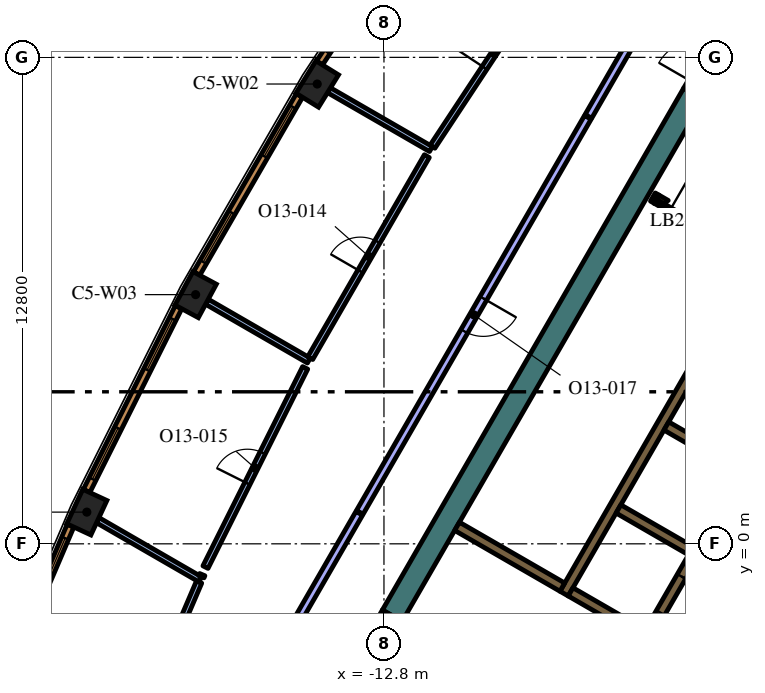
"""IFC4 building model, lengths in metres.
Left out: names, types, materials, properties, quantities, classifications, styles, units other than length and angle.
Written with IfcOpenShell. Run it as: python <this file> out.ifc"""

import sys

from ifc_helpers import new_model, si_unit, direction, frame, frame_2d, origin, origin_2d, place, context, subcontext, project, spatial, polyline, rectangle, outline, extrude, element, fill, save


model = new_model("IFC4")
c1 = context("Model", 3, precision=1e-05, world=origin(), true_north=direction((0.0, 1.0)))
c2 = subcontext(c1, "Body", "Model", "MODEL_VIEW")
j1 = project(units=[si_unit("LENGTHUNIT", "METRE"), si_unit("PLANEANGLEUNIT", "RADIAN")], contexts=[c1])
p1 = place(None, origin())
s1 = spatial("IfcSite", under=j1, at=p1, CompositionType="ELEMENT")
p2 = place(p1, origin())
s2 = spatial("IfcBuilding", under=s1, at=p2, CompositionType="ELEMENT")
p3 = place(p2, frame((0.0, 0.0, 300.6)))
s3 = spatial("IfcBuildingStorey", under=s2, at=p3, CompositionType="ELEMENT", Elevation=300.6)
for number, where, z_axis, x_axis in (
    (1, (-14.556, 12.098, 0.0), (0.0, 0.0, 1.0), (-0.526, -0.851, 0.0)),
    (2, (-17.756, 6.557, 0.0), (0.0, 0.0, 1.0), (-0.474, -0.881, 0.0)),
    (3, (-20.619, 0.834, 0.0), (0.0, 0.0, 1.0), (-0.421, -0.907, 0.0)),
):
    element("IfcColumn", number, at=place(p3, frame(where, z_axis=z_axis, x_axis=x_axis)), inside=s3, PredefinedType="COLUMN", context=c2, shape_type="SweptSolid", body=[
        extrude(rectangle(XDim=1.0, YDim=0.7, at=origin_2d()), origin(), (0.0, 0.0, 1.0), 4.2),
    ])
p4 = place(p3, frame((-12.582, -1.892, 0.0), z_axis=(0.0, 0.0, 1.0), x_axis=(0.500003640647, 0.866023301845, 0.0)))
e4 = element("IfcWall", 4, at=p4, inside=s3, PredefinedType="SOLIDWALL", context=c2, shape_type="SweptSolid", body=[
    extrude(rectangle(XDim=15.858, YDim=0.6, at=frame_2d((7.929, 0.0))), origin(), (0.0, 0.0, 1.0), 4.2),
])
p5 = place(p3, frame((-8.06, -1.311, 0.0), z_axis=(0.0, 0.0, 1.0), x_axis=(0.50000273126, 0.866023826885, 0.0)))
e5 = element("IfcWall", 5, at=p5, inside=s3, PredefinedType="SOLIDWALL", context=c2, shape_type="SweptSolid", body=[
    extrude(rectangle(XDim=10.33, YDim=0.25, at=frame_2d((5.165, 0.0))), origin(), (0.0, 0.0, 1.0), 4.2),
])
for number, where, z_axis, x_axis in (
    (6, (-5.369, 3.1, 0.0), (0.0, 0.0, 1.0), (0.866, -0.5, 0.0)),
    (7, (-4.724, -0.182, 0.0), (0.0, 0.0, 1.0), (-0.866, 0.5, 0.0)),
):
    element("IfcWall", number, at=place(p3, frame(where, z_axis=z_axis, x_axis=x_axis)), inside=s3, PredefinedType="SOLIDWALL", context=c2, shape_type="SweptSolid", body=[
        extrude(rectangle(XDim=2.2, YDim=0.25, at=frame_2d((1.1, 0.0))), origin(), (0.0, 0.0, 1.0), 4.2),
    ])
p6 = place(p3, frame((-7.889, -1.265, 0.0), z_axis=(0.0, 0.0, 1.0), x_axis=(0.865986741702, -0.500066958712, 0.0)))
e8 = element("IfcWall", 8, at=p6, inside=s3, PredefinedType="SOLIDWALL", context=c2, shape_type="SweptSolid", body=[
    extrude(rectangle(XDim=1.738, YDim=0.25, at=frame_2d((0.869, 0.0))), origin(), (0.0, 0.0, 1.0), 4.2),
])
p7 = place(p3, frame((-8.106, -1.14, 0.0), z_axis=(0.0, 0.0, 1.0), x_axis=(-0.866008981251, 0.500028443584, 0.0)))
e9 = element("IfcWall", 9, at=p7, inside=s3, PredefinedType="SOLIDWALL", context=c2, shape_type="SweptSolid", body=[
    extrude(rectangle(XDim=3.2, YDim=0.25, at=frame_2d((1.6, 0.0))), origin(), (0.0, 0.0, 1.0), 4.2),
])
p8 = place(p3, frame((-5.725, 9.125, 0.0), z_axis=(0.0, 0.0, 1.0), x_axis=(0.866185586049, -0.49972245349, 0.0)))
e10 = element("IfcWall", 10, at=p8, inside=s3, PredefinedType="SOLIDWALL", context=c2, shape_type="SweptSolid", body=[
    extrude(rectangle(XDim=0.11, YDim=0.25, at=frame_2d((0.055, 0.0))), origin(), (0.0, 0.0, 1.0), 4.2),
])
p9 = place(p3, origin())
e11 = element("IfcWall", 11, at=p9, inside=s3, PredefinedType="SOLIDWALL", context=c2, shape_type="SweptSolid", body=[
    extrude(outline(polyline([(-5.689, 8.96), (-5.69, 8.961), (-5.565, 9.177), (-5.319, 9.035), (-5.335, 9.026), (-5.351, 9.015), (-5.366, 9.002), (-5.379, 8.988), (-5.392, 8.972), (-5.402, 8.956), (-5.412, 8.939), (-5.629, 9.064), (-5.629, 9.064), (-5.689, 8.96)])), origin(), (0.0, 0.0, 1.0), 4.2),
])
p10 = place(p3, frame((-0.898, 6.194, 0.0), z_axis=(0.0, 0.0, 1.0), x_axis=(-0.499996202215, -0.866027596426, 0.0)))
e12 = element("IfcWall", 12, at=p10, inside=s3, PredefinedType="SOLIDWALL", context=c2, shape_type="SweptSolid", body=[
    extrude(rectangle(XDim=9.83, YDim=0.25, at=frame_2d((4.915, 0.0))), origin(), (0.0, 0.0, 1.0), 4.2),
])
p11 = place(p10, frame((0.585, 0.0, 0.0)))
e13 = element("IfcOpeningElement", 13, at=p11, cuts=e12, PredefinedType="OPENING", context=c2, shape_type="SweptSolid", body=[
    extrude(rectangle(XDim=1.1, YDim=2.1, at=frame_2d((0.55, 1.05))), frame((0.0, 0.135, 0.0), z_axis=(0.0, -1.0, 0.0), x_axis=(1.0, 0.0, 0.0)), (0.0, 0.0, 1.0), 0.27),
])
p12 = place(p10, frame((3.105, 0.0, 0.0)))
e14 = element("IfcOpeningElement", 14, at=p12, cuts=e12, PredefinedType="OPENING", context=c2, shape_type="SweptSolid", body=[
    extrude(rectangle(XDim=1.1, YDim=2.1, at=frame_2d((0.55, 1.05))), frame((0.0, 0.135, 0.0), z_axis=(0.0, -1.0, 0.0), x_axis=(1.0, 0.0, 0.0)), (0.0, 0.0, 1.0), 0.27),
])
p13 = place(p10, frame((5.625, 0.0, 0.0)))
e15 = element("IfcOpeningElement", 15, at=p13, cuts=e12, PredefinedType="OPENING", context=c2, shape_type="SweptSolid", body=[
    extrude(rectangle(XDim=1.1, YDim=2.1, at=frame_2d((0.55, 1.05))), frame((0.0, 0.135, 0.0), z_axis=(0.0, -1.0, 0.0), x_axis=(1.0, 0.0, 0.0)), (0.0, 0.0, 1.0), 0.27),
])
p14 = place(p10, frame((8.145, 0.0, 0.0)))
e16 = element("IfcOpeningElement", 16, at=p14, cuts=e12, PredefinedType="OPENING", context=c2, shape_type="SweptSolid", body=[
    extrude(rectangle(XDim=1.1, YDim=2.1, at=frame_2d((0.55, 1.05))), frame((0.0, 0.135, 0.0), z_axis=(0.0, -1.0, 0.0), x_axis=(1.0, 0.0, 0.0)), (0.0, 0.0, 1.0), 0.27),
])
p15 = place(p3, frame((-5.659, 9.012, 0.0), z_axis=(0.0, 0.0, 1.0), x_axis=(0.866009402589, -0.500027713859, 0.0)))
e17 = element("IfcWall", 17, at=p15, inside=s3, PredefinedType="PARTITIONING", context=c2, shape_type="SweptSolid", body=[
    extrude(rectangle(XDim=2.1, YDim=0.12, at=frame_2d((1.05, 0.0))), origin(), (0.0, 0.0, 1.0), 3.55),
])
p16 = place(p15, frame((0.45, 0.0, 0.0)))
e18 = element("IfcOpeningElement", 18, at=p16, cuts=e17, PredefinedType="OPENING", context=c2, shape_type="SweptSolid", body=[
    extrude(rectangle(XDim=1.2, YDim=2.1, at=frame_2d((0.6, 1.05))), frame((0.0, 0.07, 0.0), z_axis=(0.0, -1.0, 0.0), x_axis=(1.0, 0.0, 0.0)), (0.0, 0.0, 1.0), 0.14),
])
p17 = place(p3, frame((-4.652, 11.842, 0.0), z_axis=(0.0, 0.0, 1.0), x_axis=(0.500062241894, 0.865989465428, 0.0)))
e19 = element("IfcWall", 19, at=p17, inside=s3, PredefinedType="SOLIDWALL", context=c2, shape_type="SweptSolid", body=[
    extrude(rectangle(XDim=1.7, YDim=0.6, at=frame_2d((0.85, 0.0))), origin(), (0.0, 0.0, 1.0), 4.2),
])
p18 = place(p17, frame((0.25, 0.0, 0.0)))
e20 = element("IfcOpeningElement", 20, at=p18, cuts=e19, PredefinedType="OPENING", context=c2, shape_type="SweptSolid", body=[
    extrude(rectangle(XDim=1.2, YDim=2.1, at=frame_2d((0.6, 1.05))), frame((0.0, 0.31, 0.0), z_axis=(0.0, -1.0, 0.0), x_axis=(1.0, 0.0, 0.0)), (0.0, 0.0, 1.0), 0.62),
])
p19 = place(p3, frame((-13.432, -3.364, 0.0), z_axis=(0.0, 0.0, 1.0), x_axis=(0.500062241894, 0.865989465428, 0.0)))
e21 = element("IfcWall", 21, at=p19, inside=s3, PredefinedType="SOLIDWALL", context=c2, shape_type="SweptSolid", body=[
    extrude(rectangle(XDim=1.7, YDim=0.6, at=frame_2d((0.85, 0.0))), origin(), (0.0, 0.0, 1.0), 4.2),
])
p20 = place(p19, frame((0.25, 0.0, 0.0)))
e22 = element("IfcOpeningElement", 22, at=p20, cuts=e21, PredefinedType="OPENING", context=c2, shape_type="SweptSolid", body=[
    extrude(rectangle(XDim=1.2, YDim=2.1, at=frame_2d((0.6, 1.05))), frame((0.0, 0.31, 0.0), z_axis=(0.0, -1.0, 0.0), x_axis=(1.0, 0.0, 0.0)), (0.0, 0.0, 1.0), 0.62),
])
p21 = place(p3, frame((-11.564, 10.387, 0.0), z_axis=(0.0, 0.0, 1.0), x_axis=(-0.86604641216, 0.499963610661, 0.0)))
e23 = element("IfcWall", 23, at=p21, inside=s3, PredefinedType="PARTITIONING", context=c2, shape_type="SweptSolid", body=[
    extrude(rectangle(XDim=3.096, YDim=0.15, at=frame_2d((1.548, 0.0))), origin(), (0.0, 0.0, 1.0), 3.55),
])
p22 = place(p3, frame((-11.523, 10.449, 0.0), z_axis=(0.0, 0.0, 1.0), x_axis=(0.550751709023, 0.834669129061, 0.0)))
e24 = element("IfcWall", 24, at=p22, inside=s3, PredefinedType="PARTITIONING", context=c2, shape_type="SweptSolid", body=[
    extrude(rectangle(XDim=5.788, YDim=0.15, at=frame_2d((2.894, 0.0))), origin(), (0.0, 0.0, 1.0), 3.55),
])
p23 = place(p22, frame((2.488, 0.0, 0.0)))
e25 = element("IfcOpeningElement", 25, at=p23, cuts=e24, PredefinedType="OPENING", context=c2, shape_type="SweptSolid", body=[
    extrude(rectangle(XDim=0.9, YDim=2.1, at=frame_2d((0.45, 1.05))), frame((0.0, 0.085, 0.0), z_axis=(0.0, -1.0, 0.0), x_axis=(1.0, 0.0, 0.0)), (0.0, 0.0, 1.0), 0.17),
])
p24 = place(p3, frame((-14.777, 4.822, 0.0), z_axis=(0.0, 0.0, 1.0), x_axis=(-0.865992557167, 0.500056887695, 0.0)))
e26 = element("IfcWall", 26, at=p24, inside=s3, PredefinedType="PARTITIONING", context=c2, shape_type="SweptSolid", body=[
    extrude(rectangle(XDim=3.096, YDim=0.15, at=frame_2d((1.548, 0.0))), origin(), (0.0, 0.0, 1.0), 3.55),
])
p25 = place(p3, frame((-14.74, 4.887, 0.0), z_axis=(0.0, 0.0, 1.0), x_axis=(0.500007141444, 0.86602128063, 0.0)))
e27 = element("IfcWall", 27, at=p25, inside=s3, PredefinedType="PARTITIONING", context=c2, shape_type="SweptSolid", body=[
    extrude(rectangle(XDim=6.137, YDim=0.15, at=frame_2d((3.068, 0.0))), origin(), (0.0, 0.0, 1.0), 3.55),
])
p26 = place(p25, frame((2.637, 0.0, 0.0)))
e28 = element("IfcOpeningElement", 28, at=p26, cuts=e27, PredefinedType="OPENING", context=c2, shape_type="SweptSolid", body=[
    extrude(rectangle(XDim=0.9, YDim=2.1, at=frame_2d((0.45, 1.05))), frame((0.0, 0.085, 0.0), z_axis=(0.0, -1.0, 0.0), x_axis=(1.0, 0.0, 0.0)), (0.0, 0.0, 1.0), 0.17),
])
p27 = place(p3, frame((-17.635, -0.936, 0.0), z_axis=(0.0, 0.0, 1.0), x_axis=(-0.866044607523, 0.499966736674, 0.0)))
e29 = element("IfcWall", 29, at=p27, inside=s3, PredefinedType="PARTITIONING", context=c2, shape_type="SweptSolid", body=[
    extrude(rectangle(XDim=3.115, YDim=0.15, at=frame_2d((1.557, 0.0))), origin(), (0.0, 0.0, 1.0), 3.55),
])
p28 = place(p3, frame((-17.497, -0.613, 0.0), z_axis=(0.0, 0.0, 1.0), x_axis=(0.447480081559, 0.89429389834, 0.0)))
e30 = element("IfcWall", 30, at=p28, inside=s3, PredefinedType="PARTITIONING", context=c2, shape_type="SweptSolid", body=[
    extrude(rectangle(XDim=5.863, YDim=0.15, at=frame_2d((2.931, 0.0))), origin(), (0.0, 0.0, 1.0), 3.55),
])
p29 = place(p28, frame((2.463, 0.0, 0.0)))
e31 = element("IfcOpeningElement", 31, at=p29, cuts=e30, PredefinedType="OPENING", context=c2, shape_type="SweptSolid", body=[
    extrude(rectangle(XDim=0.9, YDim=2.1, at=frame_2d((0.45, 1.05))), frame((0.0, 0.085, 0.0), z_axis=(0.0, -1.0, 0.0), x_axis=(1.0, 0.0, 0.0)), (0.0, 0.0, 1.0), 0.17),
])
p30 = place(p3, frame((-17.581, -0.81, 0.0), z_axis=(0.0, 0.0, 1.0), x_axis=(-0.390033474923, -0.92080067791, 0.0)))
e32 = element("IfcWall", 32, at=p30, inside=s3, PredefinedType="PARTITIONING", context=c2, shape_type="SweptSolid", body=[
    extrude(rectangle(XDim=0.061, YDim=0.15, at=frame_2d((0.03, 0.0))), origin(), (0.0, 0.0, 1.0), 3.55),
])
p31 = place(p3, frame((-19.639, -5.62, 0.0), z_axis=(0.0, 0.0, 1.0), x_axis=(0.393349802257, 0.919388891092, 0.0)))
e33 = element("IfcWall", 33, at=p31, inside=s3, PredefinedType="PARTITIONING", context=c2, shape_type="SweptSolid", body=[
    extrude(rectangle(XDim=5.019, YDim=0.15, at=frame_2d((2.51, 0.0))), origin(), (0.0, 0.0, 1.0), 3.55),
])
p32 = place(p31, frame((2.019, 0.0, 0.0)))
e34 = element("IfcOpeningElement", 34, at=p32, cuts=e33, PredefinedType="OPENING", context=c2, shape_type="SweptSolid", body=[
    extrude(rectangle(XDim=0.9, YDim=2.1, at=frame_2d((0.45, 1.05))), frame((0.0, 0.085, 0.0), z_axis=(0.0, -1.0, 0.0), x_axis=(1.0, 0.0, 0.0)), (0.0, 0.0, 1.0), 0.17),
])
p33 = place(p3, frame((-7.436, 11.221, 0.0), z_axis=(0.0, 0.0, 1.0), x_axis=(-0.49999894854, -0.866026010844, 0.0)))
e35 = element("IfcWall", 35, at=p33, inside=s3, PredefinedType="PARTITIONING", context=c2, shape_type="SweptSolid", body=[
    extrude(rectangle(XDim=12.0, YDim=0.2, at=frame_2d((6.0, 0.0))), origin(), (0.0, 0.0, 1.0), 3.55),
])
p34 = place(p33, frame((5.5, 0.0, 0.0)))
e36 = element("IfcOpeningElement", 36, at=p34, cuts=e35, PredefinedType="OPENING", context=c2, shape_type="SweptSolid", body=[
    extrude(rectangle(XDim=1.0, YDim=2.1, at=frame_2d((0.5, 1.05))), frame((0.0, 0.11, 0.0), z_axis=(0.0, -1.0, 0.0), x_axis=(1.0, 0.0, 0.0)), (0.0, 0.0, 1.0), 0.22),
])
p35 = place(p3, frame((-13.451, 0.803, 0.0), z_axis=(0.0, 0.0, 1.0), x_axis=(-0.499979102685, -0.866037468519, 0.0)))
e37 = element("IfcWall", 37, at=p35, inside=s3, PredefinedType="PARTITIONING", context=c2, shape_type="SweptSolid", body=[
    extrude(rectangle(XDim=7.795, YDim=0.2, at=frame_2d((3.897, 0.0))), origin(), (0.0, 0.0, 1.0), 3.55),
])
p36 = place(p3, frame((-3.306, 18.374, 0.0), z_axis=(0.0, 0.0, 1.0), x_axis=(-0.499999798456, -0.866025520146, 0.0)))
e38 = element("IfcWall", 38, at=p36, inside=s3, PredefinedType="PARTITIONING", context=c2, shape_type="SweptSolid", body=[
    extrude(rectangle(XDim=8.229, YDim=0.2, at=frame_2d((4.115, 0.0))), origin(), (0.0, 0.0, 1.0), 3.55),
])
p37 = place(p3, frame((-11.518, 17.166, 0.0), z_axis=(0.0, 0.0, 1.0), x_axis=(-0.550744054781, -0.83467417962, 0.0)))
e39 = element("IfcWall", 39, at=p37, inside=s3, PredefinedType="SOLIDWALL", context=c2, shape_type="SweptSolid", body=[
    extrude(rectangle(XDim=5.406, YDim=0.19, at=frame_2d((2.703, 0.0))), origin(), (0.0, 0.0, 1.0), 3.95),
])
p38 = place(p37, frame((0.346, 0.0, 0.6)))
e40 = element("IfcOpeningElement", 40, at=p38, cuts=e39, PredefinedType="OPENING", context=c2, shape_type="SweptSolid", body=[
    extrude(rectangle(XDim=1.5, YDim=2.85, at=frame_2d((0.75, 1.425))), frame((0.0, 0.105, 0.0), z_axis=(0.0, -1.0, 0.0), x_axis=(1.0, 0.0, 0.0)), (0.0, 0.0, 1.0), 0.21),
])
p39 = place(p37, frame((3.559, 0.0, 0.6)))
e41 = element("IfcOpeningElement", 41, at=p39, cuts=e39, PredefinedType="OPENING", context=c2, shape_type="SweptSolid", body=[
    extrude(rectangle(XDim=1.5, YDim=2.85, at=frame_2d((0.75, 1.425))), frame((0.0, 0.105, 0.0), z_axis=(0.0, -1.0, 0.0), x_axis=(1.0, 0.0, 0.0)), (0.0, 0.0, 1.0), 0.21),
])
p40 = place(p3, frame((-15.025, 11.796, 0.0), z_axis=(0.0, 0.0, 1.0), x_axis=(-0.500024767483, -0.866011103799, 0.0)))
e42 = element("IfcWall", 42, at=p40, inside=s3, PredefinedType="SOLIDWALL", context=c2, shape_type="SweptSolid", body=[
    extrude(rectangle(XDim=5.406, YDim=0.19, at=frame_2d((2.703, 0.0))), origin(), (0.0, 0.0, 1.0), 3.95),
])
p41 = place(p40, frame((0.346, 0.0, 0.6)))
e43 = element("IfcOpeningElement", 43, at=p41, cuts=e42, PredefinedType="OPENING", context=c2, shape_type="SweptSolid", body=[
    extrude(rectangle(XDim=1.5, YDim=2.85, at=frame_2d((0.75, 1.425))), frame((0.0, 0.105, 0.0), z_axis=(0.0, -1.0, 0.0), x_axis=(1.0, 0.0, 0.0)), (0.0, 0.0, 1.0), 0.21),
])
p42 = place(p40, frame((3.559, 0.0, 0.6)))
e44 = element("IfcOpeningElement", 44, at=p42, cuts=e42, PredefinedType="OPENING", context=c2, shape_type="SweptSolid", body=[
    extrude(rectangle(XDim=1.5, YDim=2.85, at=frame_2d((0.75, 1.425))), frame((0.0, 0.105, 0.0), z_axis=(0.0, -1.0, 0.0), x_axis=(1.0, 0.0, 0.0)), (0.0, 0.0, 1.0), 0.21),
])
p43 = place(p3, frame((-18.206, 6.227, 0.0), z_axis=(0.0, 0.0, 1.0), x_axis=(-0.447484531401, -0.894291671747, 0.0)))
e45 = element("IfcWall", 45, at=p43, inside=s3, PredefinedType="SOLIDWALL", context=c2, shape_type="SweptSolid", body=[
    extrude(rectangle(XDim=5.406, YDim=0.19, at=frame_2d((2.703, 0.0))), origin(), (0.0, 0.0, 1.0), 3.95),
])
p44 = place(p43, frame((0.346, 0.0, 0.6)))
e46 = element("IfcOpeningElement", 46, at=p44, cuts=e45, PredefinedType="OPENING", context=c2, shape_type="SweptSolid", body=[
    extrude(rectangle(XDim=1.5, YDim=2.85, at=frame_2d((0.75, 1.425))), frame((0.0, 0.105, 0.0), z_axis=(0.0, -1.0, 0.0), x_axis=(1.0, 0.0, 0.0)), (0.0, 0.0, 1.0), 0.21),
])
p45 = place(p43, frame((3.559, 0.0, 0.6)))
e47 = element("IfcOpeningElement", 47, at=p45, cuts=e45, PredefinedType="OPENING", context=c2, shape_type="SweptSolid", body=[
    extrude(rectangle(XDim=1.5, YDim=2.85, at=frame_2d((0.75, 1.425))), frame((0.0, 0.105, 0.0), z_axis=(0.0, -1.0, 0.0), x_axis=(1.0, 0.0, 0.0)), (0.0, 0.0, 1.0), 0.21),
])
p46 = place(p3, frame((-21.049, 0.478, 0.0), z_axis=(0.0, 0.0, 1.0), x_axis=(-0.393347848476, -0.919389726992, 0.0)))
e48 = element("IfcWall", 48, at=p46, inside=s3, PredefinedType="SOLIDWALL", context=c2, shape_type="SweptSolid", body=[
    extrude(rectangle(XDim=5.415, YDim=0.19, at=frame_2d((2.708, 0.0))), origin(), (0.0, 0.0, 1.0), 3.95),
])
p47 = place(p46, frame((0.357, 0.0, 0.6)))
e49 = element("IfcOpeningElement", 49, at=p47, cuts=e48, PredefinedType="OPENING", context=c2, shape_type="SweptSolid", body=[
    extrude(rectangle(XDim=1.5, YDim=2.85, at=frame_2d((0.75, 1.425))), frame((0.0, 0.105, 0.0), z_axis=(0.0, -1.0, 0.0), x_axis=(1.0, 0.0, 0.0)), (0.0, 0.0, 1.0), 0.21),
])
p48 = place(p46, frame((3.593, 0.0, 0.6)))
e50 = element("IfcOpeningElement", 50, at=p48, cuts=e48, PredefinedType="OPENING", context=c2, shape_type="SweptSolid", body=[
    extrude(rectangle(XDim=1.5, YDim=2.85, at=frame_2d((0.75, 1.425))), frame((0.0, 0.105, 0.0), z_axis=(0.0, -1.0, 0.0), x_axis=(1.0, 0.0, 0.0)), (0.0, 0.0, 1.0), 0.21),
])
p49 = place(p14, origin())
e51 = element("IfcDoor", 51, at=p49, inside=s3, OperationType="DOUBLE_DOOR_SLIDING", PredefinedType="DOOR", context=c2, shape_type="SweptSolid", body=[
    extrude(rectangle(XDim=1.1, YDim=2.1, at=frame_2d((0.55, 1.05))), frame((0.0, 0.025, 0.0), z_axis=(0.0, -1.0, 0.0), x_axis=(1.0, 0.0, 0.0)), (0.0, 0.0, 1.0), 0.05),
])
fill(e16, e51)
p50 = place(p16, origin())
e52 = element("IfcDoor", 52, at=p50, inside=s3, OperationType="SINGLE_SWING_LEFT", PredefinedType="DOOR", context=c2, shape_type="SweptSolid", body=[
    extrude(rectangle(XDim=1.2, YDim=2.1, at=frame_2d((0.6, 1.05))), frame((0.0, 0.025, 0.0), z_axis=(0.0, -1.0, 0.0), x_axis=(1.0, 0.0, 0.0)), (0.0, 0.0, 1.0), 0.05),
])
fill(e18, e52)
p51 = place(p23, origin())
e53 = element("IfcDoor", 53, at=p51, inside=s3, OperationType="SINGLE_SWING_RIGHT", PredefinedType="DOOR", context=c2, shape_type="SweptSolid", body=[
    extrude(rectangle(XDim=0.9, YDim=2.1, at=frame_2d((0.45, 1.05))), frame((0.0, 0.025, 0.0), z_axis=(0.0, -1.0, 0.0), x_axis=(1.0, 0.0, 0.0)), (0.0, 0.0, 1.0), 0.05),
])
fill(e25, e53)
p52 = place(p26, origin())
e54 = element("IfcDoor", 54, at=p52, inside=s3, OperationType="SINGLE_SWING_RIGHT", PredefinedType="DOOR", context=c2, shape_type="SweptSolid", body=[
    extrude(rectangle(XDim=0.9, YDim=2.1, at=frame_2d((0.45, 1.05))), frame((0.0, 0.025, 0.0), z_axis=(0.0, -1.0, 0.0), x_axis=(1.0, 0.0, 0.0)), (0.0, 0.0, 1.0), 0.05),
])
fill(e28, e54)
p53 = place(p29, origin())
e55 = element("IfcDoor", 55, at=p53, inside=s3, OperationType="SINGLE_SWING_LEFT", PredefinedType="DOOR", context=c2, shape_type="SweptSolid", body=[
    extrude(rectangle(XDim=0.9, YDim=2.1, at=frame_2d((0.45, 1.05))), frame((0.0, 0.025, 0.0), z_axis=(0.0, -1.0, 0.0), x_axis=(1.0, 0.0, 0.0)), (0.0, 0.0, 1.0), 0.05),
])
fill(e31, e55)
p54 = place(p34, origin())
e56 = element("IfcDoor", 56, at=p54, inside=s3, OperationType="SINGLE_SWING_RIGHT", PredefinedType="DOOR", context=c2, shape_type="SweptSolid", body=[
    extrude(rectangle(XDim=1.0, YDim=2.1, at=frame_2d((0.5, 1.05))), frame((0.0, 0.025, 0.0), z_axis=(0.0, -1.0, 0.0), x_axis=(1.0, 0.0, 0.0)), (0.0, 0.0, 1.0), 0.05),
])
fill(e36, e56)
p55 = place(p39, origin())
e57 = element("IfcWindow", 57, at=p55, inside=s3, PartitioningType="SINGLE_PANEL", PredefinedType="WINDOW", context=c2, shape_type="SweptSolid", body=[
    extrude(rectangle(XDim=1.5, YDim=2.85, at=frame_2d((0.75, 1.425))), frame((0.0, 0.045, 0.0), z_axis=(0.0, -1.0, 0.0), x_axis=(1.0, 0.0, 0.0)), (0.0, 0.0, 1.0), 0.06),
])
fill(e41, e57)
p56 = place(p41, origin())
e58 = element("IfcWindow", 58, at=p56, inside=s3, PartitioningType="SINGLE_PANEL", PredefinedType="WINDOW", context=c2, shape_type="SweptSolid", body=[
    extrude(rectangle(XDim=1.5, YDim=2.85, at=frame_2d((0.75, 1.425))), frame((0.0, 0.045, 0.0), z_axis=(0.0, -1.0, 0.0), x_axis=(1.0, 0.0, 0.0)), (0.0, 0.0, 1.0), 0.06),
])
fill(e43, e58)
p57 = place(p42, origin())
e59 = element("IfcWindow", 59, at=p57, inside=s3, PartitioningType="SINGLE_PANEL", PredefinedType="WINDOW", context=c2, shape_type="SweptSolid", body=[
    extrude(rectangle(XDim=1.5, YDim=2.85, at=frame_2d((0.75, 1.425))), frame((0.0, 0.045, 0.0), z_axis=(0.0, -1.0, 0.0), x_axis=(1.0, 0.0, 0.0)), (0.0, 0.0, 1.0), 0.06),
])
fill(e44, e59)
p58 = place(p44, origin())
e60 = element("IfcWindow", 60, at=p58, inside=s3, PartitioningType="SINGLE_PANEL", PredefinedType="WINDOW", context=c2, shape_type="SweptSolid", body=[
    extrude(rectangle(XDim=1.5, YDim=2.85, at=frame_2d((0.75, 1.425))), frame((0.0, 0.045, 0.0), z_axis=(0.0, -1.0, 0.0), x_axis=(1.0, 0.0, 0.0)), (0.0, 0.0, 1.0), 0.06),
])
fill(e46, e60)
p59 = place(p45, origin())
e61 = element("IfcWindow", 61, at=p59, inside=s3, PartitioningType="SINGLE_PANEL", PredefinedType="WINDOW", context=c2, shape_type="SweptSolid", body=[
    extrude(rectangle(XDim=1.5, YDim=2.85, at=frame_2d((0.75, 1.425))), frame((0.0, 0.045, 0.0), z_axis=(0.0, -1.0, 0.0), x_axis=(1.0, 0.0, 0.0)), (0.0, 0.0, 1.0), 0.06),
])
fill(e47, e61)
p60 = place(p47, origin())
e62 = element("IfcWindow", 62, at=p60, inside=s3, PartitioningType="SINGLE_PANEL", PredefinedType="WINDOW", context=c2, shape_type="SweptSolid", body=[
    extrude(rectangle(XDim=1.5, YDim=2.85, at=frame_2d((0.75, 1.425))), frame((0.0, 0.045, 0.0), z_axis=(0.0, -1.0, 0.0), x_axis=(1.0, 0.0, 0.0)), (0.0, 0.0, 1.0), 0.06),
])
fill(e49, e62)
save(model, sys.argv[1])
